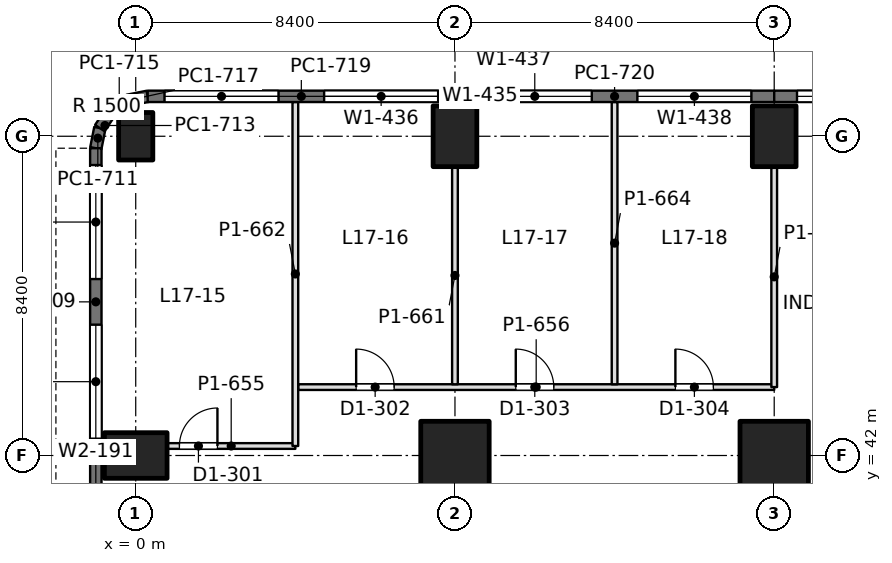
"""IFC4 building model, lengths in metres.
Left out: names, types, materials, properties, quantities, classifications, styles, units other than length and angle.
Written with IfcOpenShell. Run it as: python <this file> out.ifc"""

import sys

from ifc_helpers import new_model, si_unit, direction, frame, frame_2d, origin, origin_2d, place, context, subcontext, project, spatial, rectangle, extrude, element, fill, save


model = new_model("IFC4")
c1 = context("Model", 3, precision=1e-05, world=origin(), true_north=direction((0.0, 1.0)))
c2 = subcontext(c1, "Body", "Model", "MODEL_VIEW")
j1 = project(units=[si_unit("LENGTHUNIT", "METRE"), si_unit("PLANEANGLEUNIT", "RADIAN")], contexts=[c1])
p1 = place(None, origin())
s1 = spatial("IfcSite", under=j1, at=p1, CompositionType="ELEMENT")
p2 = place(p1, origin())
s2 = spatial("IfcBuilding", under=s1, at=p2, CompositionType="ELEMENT")
p3 = place(p2, frame((0.0, 0.0, 77.4)))
s3 = spatial("IfcBuildingStorey", under=s2, at=p3, CompositionType="ELEMENT", Elevation=77.4)
p4 = place(p3, frame((0.0, 42.0, 0.0), z_axis=(0.0, 0.0, 1.0), x_axis=(0.0, 1.0, 0.0)))
e1 = element("IfcColumn", 1, at=p4, inside=s3, PredefinedType="COLUMN", context=c2, shape_type="SweptSolid", body=[
    extrude(rectangle(XDim=1.2, YDim=1.65, at=origin_2d()), origin(), (0.0, 0.0, 1.0), 4.5),
])
p5 = place(p3, frame((0.0, 50.4, 0.0), z_axis=(0.0, 0.0, 1.0), x_axis=(1.0, 0.0, 0.0)))
e2 = element("IfcColumn", 2, at=p5, inside=s3, PredefinedType="COLUMN", context=c2, shape_type="SweptSolid", body=[
    extrude(rectangle(XDim=0.9, YDim=1.25, at=origin_2d()), origin(), (0.0, 0.0, 1.0), 4.5),
])
p6 = place(p3, frame((8.4, 42.0, 0.0), z_axis=(0.0, 0.0, 1.0), x_axis=(1.0, 0.0, 0.0)))
e3 = element("IfcColumn", 3, at=p6, inside=s3, PredefinedType="COLUMN", context=c2, shape_type="SweptSolid", body=[
    extrude(rectangle(XDim=1.8, YDim=1.8, at=origin_2d()), origin(), (0.0, 0.0, 1.0), 4.5),
])
p7 = place(p3, frame((8.4, 50.4, 0.0), z_axis=(0.0, 0.0, 1.0), x_axis=(1.0, 0.0, 0.0)))
e4 = element("IfcColumn", 4, at=p7, inside=s3, PredefinedType="COLUMN", context=c2, shape_type="SweptSolid", body=[
    extrude(rectangle(XDim=1.15, YDim=1.6, at=origin_2d()), origin(), (0.0, 0.0, 1.0), 4.5),
])
p8 = place(p3, frame((16.8, 42.0, 0.0), z_axis=(0.0, 0.0, 1.0), x_axis=(1.0, 0.0, 0.0)))
e5 = element("IfcColumn", 5, at=p8, inside=s3, PredefinedType="COLUMN", context=c2, shape_type="SweptSolid", body=[
    extrude(rectangle(XDim=1.8, YDim=1.8, at=origin_2d()), origin(), (0.0, 0.0, 1.0), 4.5),
])
p9 = place(p3, frame((16.8, 50.4, 0.0), z_axis=(0.0, 0.0, 1.0), x_axis=(1.0, 0.0, 0.0)))
e6 = element("IfcColumn", 6, at=p9, inside=s3, PredefinedType="COLUMN", context=c2, shape_type="SweptSolid", body=[
    extrude(rectangle(XDim=1.15, YDim=1.6, at=origin_2d()), origin(), (0.0, 0.0, 1.0), 4.5),
])
p10 = place(p3, frame((-1.05, 37.8, 0.0), z_axis=(0.0, 0.0, 1.0), x_axis=(0.0, 1.0, 0.0)))
e7 = element("IfcWall", 7, at=p10, inside=s3, PredefinedType="SOLIDWALL", context=c2, shape_type="SweptSolid", body=[
    extrude(rectangle(XDim=4.2, YDim=0.3, at=frame_2d((2.1, 0.0))), origin(), (0.0, 0.0, 1.0), 4.34),
])
p11 = place(p10, frame((0.9, 0.0, 0.9)))
e8 = element("IfcOpeningElement", 8, at=p11, cuts=e7, PredefinedType="OPENING", context=c2, shape_type="SweptSolid", body=[
    extrude(rectangle(XDim=2.4, YDim=1.9, at=frame_2d((1.2, 0.95))), frame((0.0, 0.16, 0.0), z_axis=(0.0, -1.0, 0.0), x_axis=(1.0, 0.0, 0.0)), (0.0, 0.0, 1.0), 0.32),
])
p12 = place(p3, frame((-1.05, 42.0, 0.0), z_axis=(0.0, 0.0, 1.0), x_axis=(0.0, 1.0, 0.0)))
e9 = element("IfcWall", 9, at=p12, inside=s3, PredefinedType="SOLIDWALL", context=c2, shape_type="SweptSolid", body=[
    extrude(rectangle(XDim=8.085, YDim=0.3, at=frame_2d((4.042, 0.0))), origin(), (0.0, 0.0, 1.0), 4.34),
])
p13 = place(p12, frame((0.443, 0.0, 0.9)))
e10 = element("IfcOpeningElement", 10, at=p13, cuts=e9, PredefinedType="OPENING", context=c2, shape_type="SweptSolid", body=[
    extrude(rectangle(XDim=3.0, YDim=1.9, at=frame_2d((1.5, 0.95))), frame((0.0, 0.16, 0.0), z_axis=(0.0, -1.0, 0.0), x_axis=(1.0, 0.0, 0.0)), (0.0, 0.0, 1.0), 0.32),
])
p14 = place(p12, frame((4.643, 0.0, 0.9)))
e11 = element("IfcOpeningElement", 11, at=p14, cuts=e9, PredefinedType="OPENING", context=c2, shape_type="SweptSolid", body=[
    extrude(rectangle(XDim=3.0, YDim=1.9, at=frame_2d((1.5, 0.95))), frame((0.0, 0.16, 0.0), z_axis=(0.0, -1.0, 0.0), x_axis=(1.0, 0.0, 0.0)), (0.0, 0.0, 1.0), 0.32),
])
p15 = place(p3, frame((-1.05, 50.085, 0.0), z_axis=(0.0, 0.0, 1.0), x_axis=(0.195073962632, 0.980788534345, 0.0)))
e12 = element("IfcWall", 12, at=p15, inside=s3, PredefinedType="SOLIDWALL", context=c2, shape_type="SweptSolid", body=[
    extrude(rectangle(XDim=0.541, YDim=0.3, at=frame_2d((0.271, 0.0))), origin(), (0.0, 0.0, 1.0), 4.34),
])
for number, where, z_axis, x_axis in (
    (13, (-0.945, 50.615, 0.0), (0.0, 0.0, 1.0), (0.556, 0.831, 0.0)),
    (14, (-0.653, 51.052, 0.0), (0.0, 0.0, 1.0), (0.831, 0.556, 0.0)),
):
    element("IfcWall", number, at=place(p3, frame(where, z_axis=z_axis, x_axis=x_axis)), inside=s3, PredefinedType="SOLIDWALL", context=c2, shape_type="SweptSolid", body=[
        extrude(rectangle(XDim=0.526, YDim=0.3, at=frame_2d((0.263, 0.0))), origin(), (0.0, 0.0, 1.0), 4.34),
    ])
p16 = place(p3, frame((-0.216, 51.344, 0.0), z_axis=(0.0, 0.0, 1.0), x_axis=(0.980788534345, 0.195073962632, 0.0)))
e15 = element("IfcWall", 15, at=p16, inside=s3, PredefinedType="SOLIDWALL", context=c2, shape_type="SweptSolid", body=[
    extrude(rectangle(XDim=0.541, YDim=0.3, at=frame_2d((0.271, 0.0))), origin(), (0.0, 0.0, 1.0), 4.34),
])
p17 = place(p3, frame((0.315, 51.45, 0.0), z_axis=(0.0, 0.0, 1.0), x_axis=(1.0, 0.0, 0.0)))
e16 = element("IfcWall", 16, at=p17, inside=s3, PredefinedType="SOLIDWALL", context=c2, shape_type="SweptSolid", body=[
    extrude(rectangle(XDim=8.085, YDim=0.3, at=frame_2d((4.042, 0.0))), origin(), (0.0, 0.0, 1.0), 4.34),
])
p18 = place(p17, frame((0.443, 0.0, 0.9)))
e17 = element("IfcOpeningElement", 17, at=p18, cuts=e16, PredefinedType="OPENING", context=c2, shape_type="SweptSolid", body=[
    extrude(rectangle(XDim=3.0, YDim=1.9, at=frame_2d((1.5, 0.95))), frame((0.0, 0.16, 0.0), z_axis=(0.0, -1.0, 0.0), x_axis=(1.0, 0.0, 0.0)), (0.0, 0.0, 1.0), 0.32),
])
p19 = place(p17, frame((4.643, 0.0, 0.9)))
e18 = element("IfcOpeningElement", 18, at=p19, cuts=e16, PredefinedType="OPENING", context=c2, shape_type="SweptSolid", body=[
    extrude(rectangle(XDim=3.0, YDim=1.9, at=frame_2d((1.5, 0.95))), frame((0.0, 0.16, 0.0), z_axis=(0.0, -1.0, 0.0), x_axis=(1.0, 0.0, 0.0)), (0.0, 0.0, 1.0), 0.32),
])
p20 = place(p3, frame((8.4, 51.45, 0.0), z_axis=(0.0, 0.0, 1.0), x_axis=(1.0, 0.0, 0.0)))
e19 = element("IfcWall", 19, at=p20, inside=s3, PredefinedType="SOLIDWALL", context=c2, shape_type="SweptSolid", body=[
    extrude(rectangle(XDim=8.4, YDim=0.3, at=frame_2d((4.2, 0.0))), origin(), (0.0, 0.0, 1.0), 4.34),
])
p21 = place(p20, frame((0.6, 0.0, 0.9)))
e20 = element("IfcOpeningElement", 20, at=p21, cuts=e19, PredefinedType="OPENING", context=c2, shape_type="SweptSolid", body=[
    extrude(rectangle(XDim=3.0, YDim=1.9, at=frame_2d((1.5, 0.95))), frame((0.0, 0.16, 0.0), z_axis=(0.0, -1.0, 0.0), x_axis=(1.0, 0.0, 0.0)), (0.0, 0.0, 1.0), 0.32),
])
p22 = place(p20, frame((4.8, 0.0, 0.9)))
e21 = element("IfcOpeningElement", 21, at=p22, cuts=e19, PredefinedType="OPENING", context=c2, shape_type="SweptSolid", body=[
    extrude(rectangle(XDim=3.0, YDim=1.9, at=frame_2d((1.5, 0.95))), frame((0.0, 0.16, 0.0), z_axis=(0.0, -1.0, 0.0), x_axis=(1.0, 0.0, 0.0)), (0.0, 0.0, 1.0), 0.32),
])
p23 = place(p3, frame((16.8, 51.45, 0.0), z_axis=(0.0, 0.0, 1.0), x_axis=(1.0, 0.0, 0.0)))
e22 = element("IfcWall", 22, at=p23, inside=s3, PredefinedType="SOLIDWALL", context=c2, shape_type="SweptSolid", body=[
    extrude(rectangle(XDim=8.4, YDim=0.3, at=frame_2d((4.2, 0.0))), origin(), (0.0, 0.0, 1.0), 4.34),
])
p24 = place(p23, frame((0.6, 0.0, 0.9)))
e23 = element("IfcOpeningElement", 23, at=p24, cuts=e22, PredefinedType="OPENING", context=c2, shape_type="SweptSolid", body=[
    extrude(rectangle(XDim=3.0, YDim=1.9, at=frame_2d((1.5, 0.95))), frame((0.0, 0.16, 0.0), z_axis=(0.0, -1.0, 0.0), x_axis=(1.0, 0.0, 0.0)), (0.0, 0.0, 1.0), 0.32),
])
p25 = place(p23, frame((4.8, 0.0, 0.9)))
e24 = element("IfcOpeningElement", 24, at=p25, cuts=e22, PredefinedType="OPENING", context=c2, shape_type="SweptSolid", body=[
    extrude(rectangle(XDim=3.0, YDim=1.9, at=frame_2d((1.5, 0.95))), frame((0.0, 0.16, 0.0), z_axis=(0.0, -1.0, 0.0), x_axis=(1.0, 0.0, 0.0)), (0.0, 0.0, 1.0), 0.32),
])
p26 = place(p3, frame((0.824, 42.25, 0.0), z_axis=(0.0, 0.0, 1.0), x_axis=(1.0, 0.0, 0.0)))
e25 = element("IfcWall", 25, at=p26, inside=s3, PredefinedType="PARTITIONING", context=c2, shape_type="SweptSolid", body=[
    extrude(rectangle(XDim=3.376, YDim=0.15, at=frame_2d((1.688, 0.0))), origin(), (0.0, 0.0, 1.0), 3.84),
])
p27 = place(p26, frame((0.326, 0.0, 0.0)))
e26 = element("IfcOpeningElement", 26, at=p27, cuts=e25, PredefinedType="OPENING", context=c2, shape_type="SweptSolid", body=[
    extrude(rectangle(XDim=1.0, YDim=2.2, at=frame_2d((0.5, 1.1))), frame((0.0, 0.085, 0.0), z_axis=(0.0, -1.0, 0.0), x_axis=(1.0, 0.0, 0.0)), (0.0, 0.0, 1.0), 0.17),
])
p28 = place(p3, frame((4.274, 43.8, 0.0), z_axis=(0.0, 0.0, 1.0), x_axis=(1.0, 0.0, 0.0)))
e27 = element("IfcWall", 27, at=p28, inside=s3, PredefinedType="PARTITIONING", context=c2, shape_type="SweptSolid", body=[
    extrude(rectangle(XDim=12.526, YDim=0.15, at=frame_2d((6.263, 0.0))), origin(), (0.0, 0.0, 1.0), 3.74),
])
p29 = place(p28, frame((1.526, 0.0, 0.0)))
e28 = element("IfcOpeningElement", 28, at=p29, cuts=e27, PredefinedType="OPENING", context=c2, shape_type="SweptSolid", body=[
    extrude(rectangle(XDim=1.0, YDim=2.2, at=frame_2d((0.5, 1.1))), frame((0.0, 0.085, 0.0), z_axis=(0.0, -1.0, 0.0), x_axis=(1.0, 0.0, 0.0)), (0.0, 0.0, 1.0), 0.17),
])
p30 = place(p28, frame((5.726, 0.0, 0.0)))
e29 = element("IfcOpeningElement", 29, at=p30, cuts=e27, PredefinedType="OPENING", context=c2, shape_type="SweptSolid", body=[
    extrude(rectangle(XDim=1.0, YDim=2.2, at=frame_2d((0.5, 1.1))), frame((0.0, 0.085, 0.0), z_axis=(0.0, -1.0, 0.0), x_axis=(1.0, 0.0, 0.0)), (0.0, 0.0, 1.0), 0.17),
])
p31 = place(p28, frame((9.926, 0.0, 0.0)))
e30 = element("IfcOpeningElement", 30, at=p31, cuts=e27, PredefinedType="OPENING", context=c2, shape_type="SweptSolid", body=[
    extrude(rectangle(XDim=1.0, YDim=2.2, at=frame_2d((0.5, 1.1))), frame((0.0, 0.085, 0.0), z_axis=(0.0, -1.0, 0.0), x_axis=(1.0, 0.0, 0.0)), (0.0, 0.0, 1.0), 0.17),
])
p32 = place(p3, frame((4.2, 42.25, 0.0), z_axis=(0.0, 0.0, 1.0), x_axis=(0.0, 1.0, 0.0)))
e31 = element("IfcWall", 31, at=p32, inside=s3, PredefinedType="PARTITIONING", context=c2, shape_type="SweptSolid", body=[
    extrude(rectangle(XDim=9.052, YDim=0.15, at=frame_2d((4.526, 0.0))), origin(), (0.0, 0.0, 1.0), 3.84),
])
p33 = place(p3, frame((8.4, 43.874, 0.0), z_axis=(0.0, 0.0, 1.0), x_axis=(0.0, 1.0, 0.0)))
e32 = element("IfcWall", 32, at=p33, inside=s3, PredefinedType="PARTITIONING", context=c2, shape_type="SweptSolid", body=[
    extrude(rectangle(XDim=5.727, YDim=0.15, at=frame_2d((2.864, 0.0))), origin(), (0.0, 0.0, 1.0), 3.74),
])
p34 = place(p3, frame((12.6, 43.874, 0.0), z_axis=(0.0, 0.0, 1.0), x_axis=(0.0, 1.0, 0.0)))
e33 = element("IfcWall", 33, at=p34, inside=s3, PredefinedType="PARTITIONING", context=c2, shape_type="SweptSolid", body=[
    extrude(rectangle(XDim=7.428, YDim=0.15, at=frame_2d((3.714, 0.0))), origin(), (0.0, 0.0, 1.0), 3.84),
])
p35 = place(p3, frame((16.8, 43.8, 0.0), z_axis=(0.0, 0.0, 1.0), x_axis=(0.0, 1.0, 0.0)))
e34 = element("IfcWall", 34, at=p35, inside=s3, PredefinedType="PARTITIONING", context=c2, shape_type="SweptSolid", body=[
    extrude(rectangle(XDim=5.801, YDim=0.15, at=frame_2d((2.9, 0.0))), origin(), (0.0, 0.0, 1.0), 3.74),
])
p36 = place(p13, origin())
e35 = element("IfcWindow", 35, at=p36, inside=s3, PartitioningType="SINGLE_PANEL", PredefinedType="WINDOW", context=c2, shape_type="SweptSolid", body=[
    extrude(rectangle(XDim=3.0, YDim=1.9, at=frame_2d((1.5, 0.95))), frame((0.0, 0.03, 0.0), z_axis=(0.0, -1.0, 0.0), x_axis=(1.0, 0.0, 0.0)), (0.0, 0.0, 1.0), 0.06),
])
fill(e10, e35)
p37 = place(p14, origin())
e36 = element("IfcWindow", 36, at=p37, inside=s3, PartitioningType="SINGLE_PANEL", PredefinedType="WINDOW", context=c2, shape_type="SweptSolid", body=[
    extrude(rectangle(XDim=3.0, YDim=1.9, at=frame_2d((1.5, 0.95))), frame((0.0, 0.03, 0.0), z_axis=(0.0, -1.0, 0.0), x_axis=(1.0, 0.0, 0.0)), (0.0, 0.0, 1.0), 0.06),
])
fill(e11, e36)
p38 = place(p18, origin())
e37 = element("IfcWindow", 37, at=p38, inside=s3, PartitioningType="SINGLE_PANEL", PredefinedType="WINDOW", context=c2, shape_type="SweptSolid", body=[
    extrude(rectangle(XDim=3.0, YDim=1.9, at=frame_2d((1.5, 0.95))), frame((0.0, 0.03, 0.0), z_axis=(0.0, -1.0, 0.0), x_axis=(1.0, 0.0, 0.0)), (0.0, 0.0, 1.0), 0.06),
])
fill(e17, e37)
p39 = place(p19, origin())
e38 = element("IfcWindow", 38, at=p39, inside=s3, PartitioningType="SINGLE_PANEL", PredefinedType="WINDOW", context=c2, shape_type="SweptSolid", body=[
    extrude(rectangle(XDim=3.0, YDim=1.9, at=frame_2d((1.5, 0.95))), frame((0.0, 0.03, 0.0), z_axis=(0.0, -1.0, 0.0), x_axis=(1.0, 0.0, 0.0)), (0.0, 0.0, 1.0), 0.06),
])
fill(e18, e38)
p40 = place(p21, origin())
e39 = element("IfcWindow", 39, at=p40, inside=s3, PartitioningType="SINGLE_PANEL", PredefinedType="WINDOW", context=c2, shape_type="SweptSolid", body=[
    extrude(rectangle(XDim=3.0, YDim=1.9, at=frame_2d((1.5, 0.95))), frame((0.0, 0.03, 0.0), z_axis=(0.0, -1.0, 0.0), x_axis=(1.0, 0.0, 0.0)), (0.0, 0.0, 1.0), 0.06),
])
fill(e20, e39)
p41 = place(p22, origin())
e40 = element("IfcWindow", 40, at=p41, inside=s3, PartitioningType="SINGLE_PANEL", PredefinedType="WINDOW", context=c2, shape_type="SweptSolid", body=[
    extrude(rectangle(XDim=3.0, YDim=1.9, at=frame_2d((1.5, 0.95))), frame((0.0, 0.03, 0.0), z_axis=(0.0, -1.0, 0.0), x_axis=(1.0, 0.0, 0.0)), (0.0, 0.0, 1.0), 0.06),
])
fill(e21, e40)
p42 = place(p24, origin())
e41 = element("IfcWindow", 41, at=p42, inside=s3, PartitioningType="SINGLE_PANEL", PredefinedType="WINDOW", context=c2, shape_type="SweptSolid", body=[
    extrude(rectangle(XDim=3.0, YDim=1.9, at=frame_2d((1.5, 0.95))), frame((0.0, 0.03, 0.0), z_axis=(0.0, -1.0, 0.0), x_axis=(1.0, 0.0, 0.0)), (0.0, 0.0, 1.0), 0.06),
])
fill(e23, e41)
p43 = place(p27, origin())
e42 = element("IfcDoor", 42, at=p43, inside=s3, OperationType="SINGLE_SWING_RIGHT", PredefinedType="DOOR", context=c2, shape_type="SweptSolid", body=[
    extrude(rectangle(XDim=1.0, YDim=2.2, at=frame_2d((0.5, 1.1))), frame((0.0, 0.025, 0.0), z_axis=(0.0, -1.0, 0.0), x_axis=(1.0, 0.0, 0.0)), (0.0, 0.0, 1.0), 0.05),
])
fill(e26, e42)
p44 = place(p29, origin())
e43 = element("IfcDoor", 43, at=p44, inside=s3, OperationType="SINGLE_SWING_LEFT", PredefinedType="DOOR", context=c2, shape_type="SweptSolid", body=[
    extrude(rectangle(XDim=1.0, YDim=2.2, at=frame_2d((0.5, 1.1))), frame((0.0, 0.025, 0.0), z_axis=(0.0, -1.0, 0.0), x_axis=(1.0, 0.0, 0.0)), (0.0, 0.0, 1.0), 0.05),
])
fill(e28, e43)
p45 = place(p30, origin())
e44 = element("IfcDoor", 44, at=p45, inside=s3, OperationType="SINGLE_SWING_LEFT", PredefinedType="DOOR", context=c2, shape_type="SweptSolid", body=[
    extrude(rectangle(XDim=1.0, YDim=2.2, at=frame_2d((0.5, 1.1))), frame((0.0, 0.025, 0.0), z_axis=(0.0, -1.0, 0.0), x_axis=(1.0, 0.0, 0.0)), (0.0, 0.0, 1.0), 0.05),
])
fill(e29, e44)
p46 = place(p31, origin())
e45 = element("IfcDoor", 45, at=p46, inside=s3, OperationType="SINGLE_SWING_LEFT", PredefinedType="DOOR", context=c2, shape_type="SweptSolid", body=[
    extrude(rectangle(XDim=1.0, YDim=2.2, at=frame_2d((0.5, 1.1))), frame((0.0, 0.025, 0.0), z_axis=(0.0, -1.0, 0.0), x_axis=(1.0, 0.0, 0.0)), (0.0, 0.0, 1.0), 0.05),
])
fill(e30, e45)
save(model, sys.argv[1])
